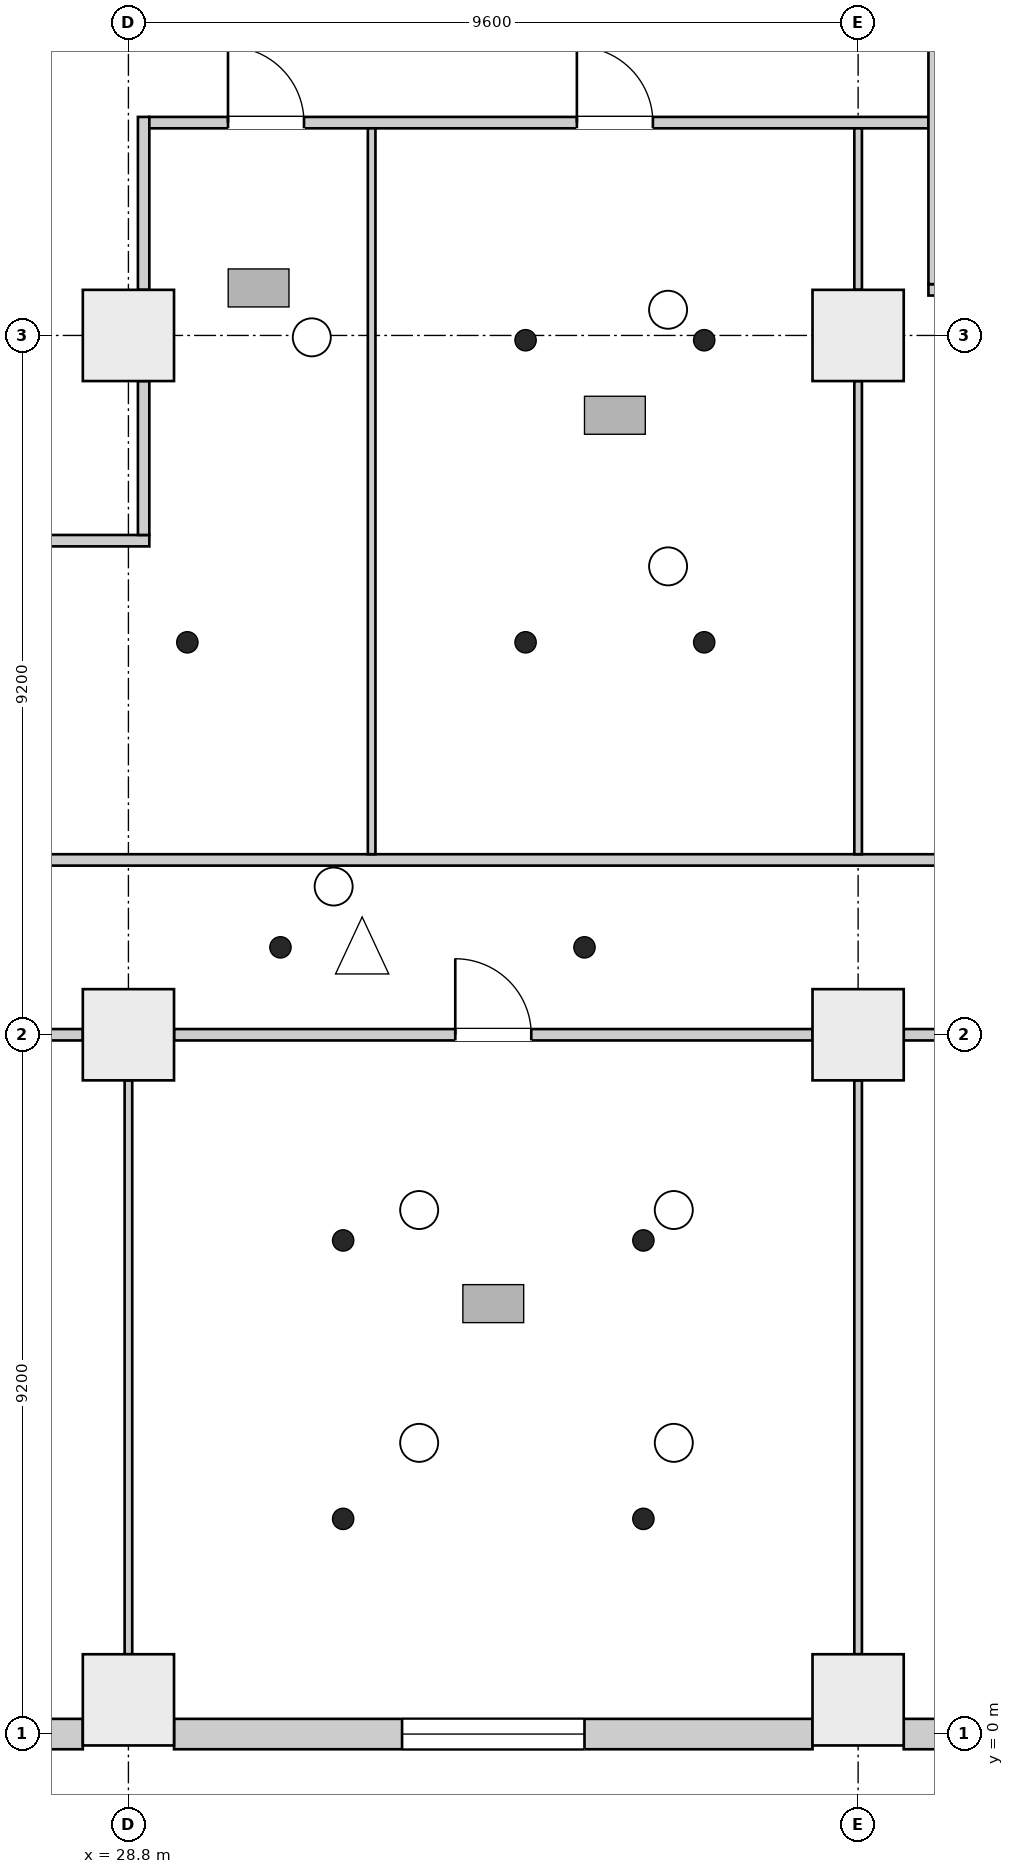
"""IFC4 building model, lengths in metres.
Left out: names, types, materials, properties, quantities, classifications, styles, units other than length and angle.
Written with IfcOpenShell. Run it as: python <this file> out.ifc"""

import sys

from ifc_helpers import new_model, si_unit, direction, frame, frame_2d, origin, origin_2d, place, context, subcontext, project, spatial, rectangle, extrude, element, fill, save


model = new_model("IFC4")
c1 = context("Model", 3, precision=1e-05, world=origin(), true_north=direction((0.0, 1.0)))
c2 = subcontext(c1, "Body", "Model", "MODEL_VIEW")
j1 = project(units=[si_unit("LENGTHUNIT", "METRE"), si_unit("PLANEANGLEUNIT", "RADIAN")], contexts=[c1])
p1 = place(None, origin())
s1 = spatial("IfcSite", under=j1, at=p1, CompositionType="ELEMENT")
p2 = place(p1, origin())
s2 = spatial("IfcBuilding", under=s1, at=p2, CompositionType="ELEMENT")
p3 = place(p2, frame((0.0, 0.0, 21.7)))
s3 = spatial("IfcBuildingStorey", under=s2, at=p3, CompositionType="ELEMENT", Elevation=21.7)
for number, where, z_axis, x_axis in (
    (1, (28.8, 0.45, 0.0), (0.0, 0.0, 1.0), (1.0, 0.0, 0.0)),
    (2, (38.4, 0.45, 0.0), (0.0, 0.0, 1.0), (1.0, 0.0, 0.0)),
    (3, (28.8, 9.2, 0.0), (0.0, 0.0, 1.0), (1.0, 0.0, 0.0)),
    (4, (38.4, 9.2, 0.0), (0.0, 0.0, 1.0), (1.0, 0.0, 0.0)),
    (5, (28.8, 18.4, 0.0), (0.0, 0.0, 1.0), (1.0, 0.0, 0.0)),
    (6, (38.4, 18.4, 0.0), (0.0, 0.0, 1.0), (1.0, 0.0, 0.0)),
):
    element("IfcColumn", number, at=place(p3, frame(where, z_axis=z_axis, x_axis=x_axis)), inside=s3, PredefinedType="COLUMN", context=c2, shape_type="SweptSolid", body=[
        extrude(rectangle(XDim=1.2, YDim=1.2, at=origin_2d()), origin(), (0.0, 0.0, 1.0), 5.0),
    ])
p4 = place(p3, frame((19.8, 0.0, 0.0), z_axis=(0.0, 0.0, 1.0), x_axis=(1.0, 0.0, 0.0)))
e7 = element("IfcWall", 7, at=p4, inside=s3, PredefinedType="ELEMENTEDWALL", context=c2, shape_type="SweptSolid", body=[
    extrude(rectangle(XDim=8.4, YDim=0.4, at=frame_2d((4.2, 0.0))), origin(), (0.0, 0.0, 1.0), 4.65),
])
p5 = place(p4, frame((3.0, 0.0, 1.0)))
e8 = element("IfcOpeningElement", 8, at=p5, cuts=e7, PredefinedType="OPENING", context=c2, shape_type="SweptSolid", body=[
    extrude(rectangle(XDim=2.4, YDim=2.2, at=frame_2d((1.2, 1.1))), frame((0.0, 0.21, 0.0), z_axis=(0.0, -1.0, 0.0), x_axis=(1.0, 0.0, 0.0)), (0.0, 0.0, 1.0), 0.42),
])
p6 = place(p3, frame((29.4, 0.0, 0.0), z_axis=(0.0, 0.0, 1.0), x_axis=(1.0, 0.0, 0.0)))
e9 = element("IfcWall", 9, at=p6, inside=s3, PredefinedType="ELEMENTEDWALL", context=c2, shape_type="SweptSolid", body=[
    extrude(rectangle(XDim=8.4, YDim=0.4, at=frame_2d((4.2, 0.0))), origin(), (0.0, 0.0, 1.0), 4.65),
])
p7 = place(p6, frame((3.0, 0.0, 1.0)))
e10 = element("IfcOpeningElement", 10, at=p7, cuts=e9, PredefinedType="OPENING", context=c2, shape_type="SweptSolid", body=[
    extrude(rectangle(XDim=2.4, YDim=2.2, at=frame_2d((1.2, 1.1))), frame((0.0, 0.21, 0.0), z_axis=(0.0, -1.0, 0.0), x_axis=(1.0, 0.0, 0.0)), (0.0, 0.0, 1.0), 0.42),
])
p8 = place(p3, frame((39.0, 0.0, 0.0), z_axis=(0.0, 0.0, 1.0), x_axis=(1.0, 0.0, 0.0)))
e11 = element("IfcWall", 11, at=p8, inside=s3, PredefinedType="ELEMENTEDWALL", context=c2, shape_type="SweptSolid", body=[
    extrude(rectangle(XDim=8.4, YDim=0.4, at=frame_2d((4.2, 0.0))), origin(), (0.0, 0.0, 1.0), 4.65),
])
p9 = place(p8, frame((3.0, 0.0, 1.0)))
e12 = element("IfcOpeningElement", 12, at=p9, cuts=e11, PredefinedType="OPENING", context=c2, shape_type="SweptSolid", body=[
    extrude(rectangle(XDim=2.4, YDim=2.2, at=frame_2d((1.2, 1.1))), frame((0.0, 0.21, 0.0), z_axis=(0.0, -1.0, 0.0), x_axis=(1.0, 0.0, 0.0)), (0.0, 0.0, 1.0), 0.42),
])
p10 = place(p3, frame((19.8, 9.2, 0.0), z_axis=(0.0, 0.0, 1.0), x_axis=(1.0, 0.0, 0.0)))
e13 = element("IfcWall", 13, at=p10, inside=s3, PredefinedType="PARTITIONING", context=c2, shape_type="SweptSolid", body=[
    extrude(rectangle(XDim=8.4, YDim=0.15, at=frame_2d((4.2, 0.0))), origin(), (0.0, 0.0, 1.0), 4.25),
])
p11 = place(p3, frame((27.206, 11.5, 0.0), z_axis=(0.0, 0.0, 1.0), x_axis=(1.0, 0.0, 0.0)))
e14 = element("IfcWall", 14, at=p11, inside=s3, PredefinedType="PARTITIONING", context=c2, shape_type="SweptSolid", body=[
    extrude(rectangle(XDim=24.069, YDim=0.15, at=frame_2d((12.034, 0.0))), origin(), (0.0, 0.0, 1.0), 4.65),
])
p12 = place(p11, frame((13.894, 0.0, 0.0)))
e15 = element("IfcOpeningElement", 15, at=p12, cuts=e14, PredefinedType="OPENING", context=c2, shape_type="SweptSolid", body=[
    extrude(rectangle(XDim=1.0, YDim=2.1, at=frame_2d((0.5, 1.05))), frame((0.0, 0.085, 0.0), z_axis=(0.0, -1.0, 0.0), x_axis=(1.0, 0.0, 0.0)), (0.0, 0.0, 1.0), 0.17),
])
p13 = place(p11, frame((20.259, 0.0, 0.0)))
e16 = element("IfcOpeningElement", 16, at=p13, cuts=e14, PredefinedType="OPENING", context=c2, shape_type="SweptSolid", body=[
    extrude(rectangle(XDim=1.0, YDim=2.1, at=frame_2d((0.5, 1.05))), frame((0.0, 0.085, 0.0), z_axis=(0.0, -1.0, 0.0), x_axis=(1.0, 0.0, 0.0)), (0.0, 0.0, 1.0), 0.17),
])
p14 = place(p3, frame((27.206, 15.7, 0.0), z_axis=(0.0, 0.0, 1.0), x_axis=(1.0, 0.0, 0.0)))
e17 = element("IfcWall", 17, at=p14, inside=s3, PredefinedType="PARTITIONING", context=c2, shape_type="SweptSolid", body=[
    extrude(rectangle(XDim=1.869, YDim=0.15, at=frame_2d((0.935, 0.0))), origin(), (0.0, 0.0, 1.0), 4.65),
])
p15 = place(p3, frame((28.8, 1.05, 0.0), z_axis=(0.0, 0.0, 1.0), x_axis=(0.0, 1.0, 0.0)))
e18 = element("IfcWall", 18, at=p15, inside=s3, PredefinedType="PARTITIONING", context=c2, shape_type="SweptSolid", body=[
    extrude(rectangle(XDim=7.55, YDim=0.1, at=frame_2d((3.775, 0.0))), origin(), (0.0, 0.0, 1.0), 4.25),
])
p16 = place(p3, frame((29.0, 15.775, 0.0), z_axis=(0.0, 0.0, 1.0), x_axis=(0.0, 1.0, 0.0)))
e19 = element("IfcWall", 19, at=p16, inside=s3, PredefinedType="PARTITIONING", context=c2, shape_type="SweptSolid", body=[
    extrude(rectangle(XDim=2.025, YDim=0.15, at=frame_2d((1.013, 0.0))), origin(), (0.0, 0.0, 1.0), 4.25),
])
p17 = place(p3, frame((29.0, 19.0, 0.0), z_axis=(0.0, 0.0, 1.0), x_axis=(0.0, 1.0, 0.0)))
e20 = element("IfcWall", 20, at=p17, inside=s3, PredefinedType="PARTITIONING", context=c2, shape_type="SweptSolid", body=[
    extrude(rectangle(XDim=2.275, YDim=0.15, at=frame_2d((1.137, 0.0))), origin(), (0.0, 0.0, 1.0), 4.25),
])
p18 = place(p3, frame((29.075, 21.2, 0.0), z_axis=(0.0, 0.0, 1.0), x_axis=(1.0, 0.0, 0.0)))
e21 = element("IfcWall", 21, at=p18, inside=s3, PredefinedType="PARTITIONING", context=c2, shape_type="SweptSolid", body=[
    extrude(rectangle(XDim=10.25, YDim=0.15, at=frame_2d((5.125, 0.0))), origin(), (0.0, 0.0, 1.0), 4.65),
])
p19 = place(p18, frame((1.035, 0.0, 0.0)))
e22 = element("IfcOpeningElement", 22, at=p19, cuts=e21, PredefinedType="OPENING", context=c2, shape_type="SweptSolid", body=[
    extrude(rectangle(XDim=1.0, YDim=2.1, at=frame_2d((0.5, 1.05))), frame((0.0, 0.085, 0.0), z_axis=(0.0, -1.0, 0.0), x_axis=(1.0, 0.0, 0.0)), (0.0, 0.0, 1.0), 0.17),
])
p20 = place(p18, frame((5.625, 0.0, 0.0)))
e23 = element("IfcOpeningElement", 23, at=p20, cuts=e21, PredefinedType="OPENING", context=c2, shape_type="SweptSolid", body=[
    extrude(rectangle(XDim=1.0, YDim=2.1, at=frame_2d((0.5, 1.05))), frame((0.0, 0.085, 0.0), z_axis=(0.0, -1.0, 0.0), x_axis=(1.0, 0.0, 0.0)), (0.0, 0.0, 1.0), 0.17),
])
p21 = place(p3, frame((29.4, 9.2, 0.0), z_axis=(0.0, 0.0, 1.0), x_axis=(1.0, 0.0, 0.0)))
e24 = element("IfcWall", 24, at=p21, inside=s3, PredefinedType="PARTITIONING", context=c2, shape_type="SweptSolid", body=[
    extrude(rectangle(XDim=8.4, YDim=0.15, at=frame_2d((4.2, 0.0))), origin(), (0.0, 0.0, 1.0), 4.25),
])
p22 = place(p21, frame((3.7, 0.0, 0.0)))
e25 = element("IfcOpeningElement", 25, at=p22, cuts=e24, PredefinedType="OPENING", context=c2, shape_type="SweptSolid", body=[
    extrude(rectangle(XDim=1.0, YDim=2.1, at=frame_2d((0.5, 1.05))), frame((0.0, 0.085, 0.0), z_axis=(0.0, -1.0, 0.0), x_axis=(1.0, 0.0, 0.0)), (0.0, 0.0, 1.0), 0.17),
])
p23 = place(p3, frame((32.0, 11.575, 0.0), z_axis=(0.0, 0.0, 1.0), x_axis=(0.0, 1.0, 0.0)))
e26 = element("IfcWall", 26, at=p23, inside=s3, PredefinedType="PARTITIONING", context=c2, shape_type="SweptSolid", body=[
    extrude(rectangle(XDim=9.55, YDim=0.1, at=frame_2d((4.775, 0.0))), origin(), (0.0, 0.0, 1.0), 4.65),
])
p24 = place(p3, frame((38.4, 1.05, 0.0), z_axis=(0.0, 0.0, 1.0), x_axis=(0.0, 1.0, 0.0)))
e27 = element("IfcWall", 27, at=p24, inside=s3, PredefinedType="PARTITIONING", context=c2, shape_type="SweptSolid", body=[
    extrude(rectangle(XDim=7.55, YDim=0.1, at=frame_2d((3.775, 0.0))), origin(), (0.0, 0.0, 1.0), 4.25),
])
p25 = place(p3, frame((38.4, 11.575, 0.0), z_axis=(0.0, 0.0, 1.0), x_axis=(0.0, 1.0, 0.0)))
e28 = element("IfcWall", 28, at=p25, inside=s3, PredefinedType="PARTITIONING", context=c2, shape_type="SweptSolid", body=[
    extrude(rectangle(XDim=6.225, YDim=0.1, at=frame_2d((3.113, 0.0))), origin(), (0.0, 0.0, 1.0), 4.25),
])
p26 = place(p3, frame((38.4, 19.0, 0.0), z_axis=(0.0, 0.0, 1.0), x_axis=(0.0, 1.0, 0.0)))
e29 = element("IfcWall", 29, at=p26, inside=s3, PredefinedType="PARTITIONING", context=c2, shape_type="SweptSolid", body=[
    extrude(rectangle(XDim=2.125, YDim=0.1, at=frame_2d((1.062, 0.0))), origin(), (0.0, 0.0, 1.0), 4.25),
])
p27 = place(p3, frame((39.0, 9.2, 0.0), z_axis=(0.0, 0.0, 1.0), x_axis=(1.0, 0.0, 0.0)))
e30 = element("IfcWall", 30, at=p27, inside=s3, PredefinedType="PARTITIONING", context=c2, shape_type="SweptSolid", body=[
    extrude(rectangle(XDim=8.4, YDim=0.15, at=frame_2d((4.2, 0.0))), origin(), (0.0, 0.0, 1.0), 4.25),
])
p28 = place(p27, frame((3.7, 0.0, 0.0)))
e31 = element("IfcOpeningElement", 31, at=p28, cuts=e30, PredefinedType="OPENING", context=c2, shape_type="SweptSolid", body=[
    extrude(rectangle(XDim=1.0, YDim=2.1, at=frame_2d((0.5, 1.05))), frame((0.0, 0.085, 0.0), z_axis=(0.0, -1.0, 0.0), x_axis=(1.0, 0.0, 0.0)), (0.0, 0.0, 1.0), 0.17),
])
p29 = place(p3, frame((39.325, 19.0, 0.0), z_axis=(0.0, 0.0, 1.0), x_axis=(1.0, 0.0, 0.0)))
e32 = element("IfcWall", 32, at=p29, inside=s3, PredefinedType="PARTITIONING", context=c2, shape_type="SweptSolid", body=[
    extrude(rectangle(XDim=8.075, YDim=0.15, at=frame_2d((4.038, 0.0))), origin(), (0.0, 0.0, 1.0), 4.65),
])
p30 = place(p3, frame((39.4, 19.075, 0.0), z_axis=(0.0, 0.0, 1.0), x_axis=(0.0, 1.0, 0.0)))
e33 = element("IfcWall", 33, at=p30, inside=s3, PredefinedType="PARTITIONING", context=c2, shape_type="SweptSolid", body=[
    extrude(rectangle(XDim=8.0, YDim=0.15, at=frame_2d((4.0, 0.0))), origin(), (0.0, 0.0, 1.0), 4.65),
])
p31 = place(p30, frame((3.425, 0.0, 0.0)))
e34 = element("IfcOpeningElement", 34, at=p31, cuts=e33, PredefinedType="OPENING", context=c2, shape_type="SweptSolid", body=[
    extrude(rectangle(XDim=1.0, YDim=2.1, at=frame_2d((0.5, 1.05))), frame((0.0, 0.085, 0.0), z_axis=(0.0, -1.0, 0.0), x_axis=(1.0, 0.0, 0.0)), (0.0, 0.0, 1.0), 0.17),
])
p32 = place(p7, origin())
e35 = element("IfcWindow", 35, at=p32, inside=s3, PartitioningType="SINGLE_PANEL", PredefinedType="WINDOW", context=c2, shape_type="SweptSolid", body=[
    extrude(rectangle(XDim=2.4, YDim=2.2, at=frame_2d((1.2, 1.1))), frame((0.0, 0.03, 0.0), z_axis=(0.0, -1.0, 0.0), x_axis=(1.0, 0.0, 0.0)), (0.0, 0.0, 1.0), 0.06),
])
fill(e10, e35)
p33 = place(p19, origin())
e36 = element("IfcDoor", 36, at=p33, inside=s3, OperationType="SINGLE_SWING_RIGHT", PredefinedType="DOOR", context=c2, shape_type="SweptSolid", body=[
    extrude(rectangle(XDim=1.0, YDim=2.1, at=frame_2d((0.5, 1.05))), frame((0.0, 0.025, 0.0), z_axis=(0.0, -1.0, 0.0), x_axis=(1.0, 0.0, 0.0)), (0.0, 0.0, 1.0), 0.05),
])
fill(e22, e36)
p34 = place(p20, origin())
e37 = element("IfcDoor", 37, at=p34, inside=s3, OperationType="SINGLE_SWING_LEFT", PredefinedType="DOOR", context=c2, shape_type="SweptSolid", body=[
    extrude(rectangle(XDim=1.0, YDim=2.1, at=frame_2d((0.5, 1.05))), frame((0.0, 0.025, 0.0), z_axis=(0.0, -1.0, 0.0), x_axis=(1.0, 0.0, 0.0)), (0.0, 0.0, 1.0), 0.05),
])
fill(e23, e37)
p35 = place(p22, origin())
e38 = element("IfcDoor", 38, at=p35, inside=s3, OperationType="SINGLE_SWING_LEFT", PredefinedType="DOOR", context=c2, shape_type="SweptSolid", body=[
    extrude(rectangle(XDim=1.0, YDim=2.1, at=frame_2d((0.5, 1.05))), frame((0.0, 0.025, 0.0), z_axis=(0.0, -1.0, 0.0), x_axis=(1.0, 0.0, 0.0)), (0.0, 0.0, 1.0), 0.05),
])
fill(e25, e38)
save(model, sys.argv[1])
